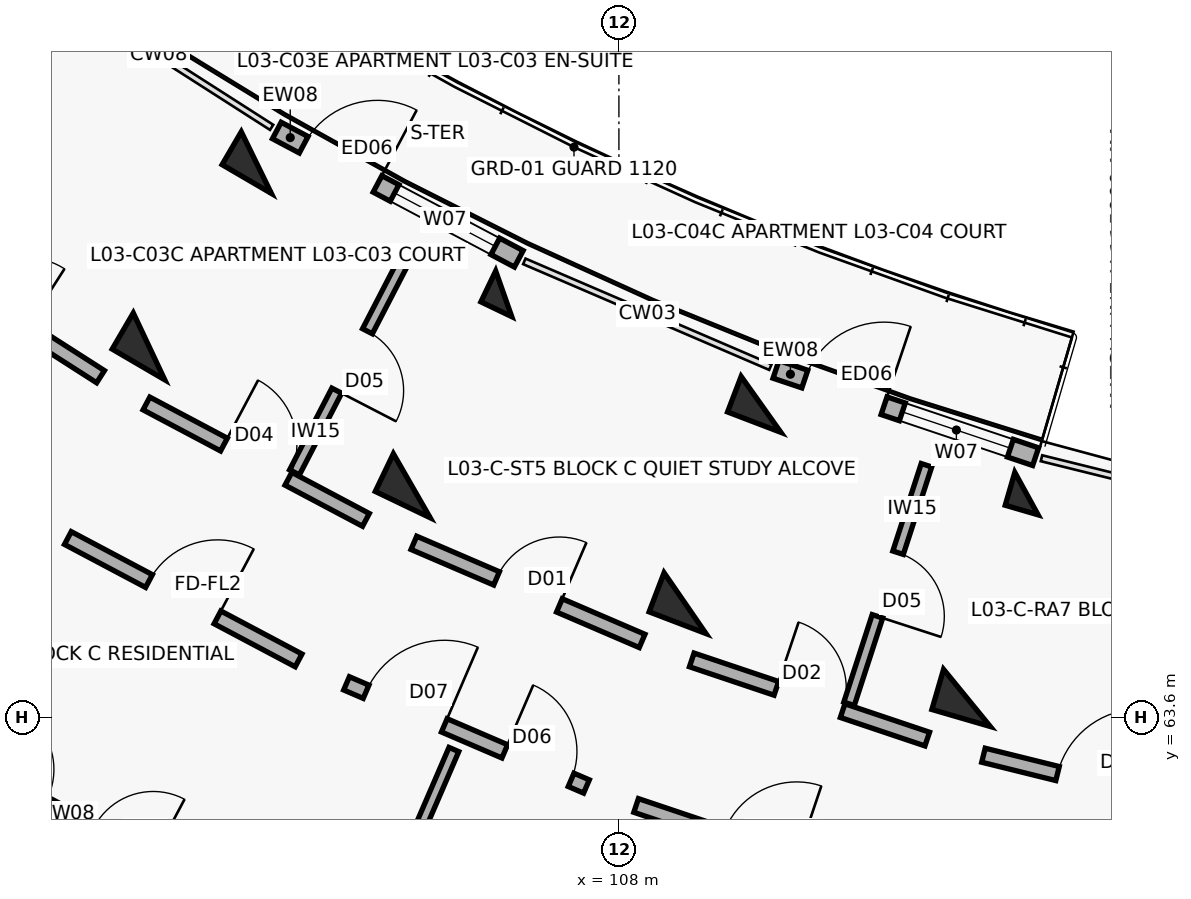
"""IFC4 building model, lengths in metres.
Left out: names, types, materials, properties, quantities, classifications, styles, units other than length and angle.
Written with IfcOpenShell. Run it as: python <this file> out.ifc"""

import sys

from ifc_helpers import new_model, si_unit, direction, frame, frame_2d, origin, origin_2d, place, context, subcontext, project, spatial, rectangle, extrude, element, fill, save


model = new_model("IFC4")
c1 = context("Model", 3, precision=1e-05, world=origin(), true_north=direction((0.0, 1.0)))
c2 = subcontext(c1, "Body", "Model", "MODEL_VIEW")
j1 = project(units=[si_unit("LENGTHUNIT", "METRE"), si_unit("PLANEANGLEUNIT", "RADIAN")], contexts=[c1])
p1 = place(None, origin())
s1 = spatial("IfcSite", under=j1, at=p1, CompositionType="ELEMENT")
p2 = place(p1, origin())
s2 = spatial("IfcBuilding", under=s1, at=p2, CompositionType="ELEMENT")
p3 = place(p2, frame((0.0, 0.0, 11.2)))
s3 = spatial("IfcBuildingStorey", under=s2, at=p3, CompositionType="ELEMENT", Elevation=11.2)
p4 = place(p3, frame((103.229, 70.896, 0.0), z_axis=(0.0, 0.0, 1.0), x_axis=(-0.504226211181, -0.863571611366, 0.0)))
e1 = element("IfcColumn", 1, at=p4, inside=s3, PredefinedType="COLUMN", context=c2, shape_type="SweptSolid", body=[
    extrude(rectangle(XDim=0.5, YDim=0.75, at=origin_2d()), origin(), (0.0, 0.0, 1.0), 3.1),
])
p5 = place(p3, frame((101.817, 68.478, 0.0), z_axis=(0.0, 0.0, 1.0), x_axis=(-0.504226211181, -0.863571611366, 0.0)))
e2 = element("IfcColumn", 2, at=p5, inside=s3, PredefinedType="COLUMN", context=c2, shape_type="SweptSolid", body=[
    extrude(rectangle(XDim=0.55, YDim=0.8, at=origin_2d()), origin(), (0.0, 0.0, 1.0), 3.1),
])
p6 = place(p3, frame((106.484, 69.169, 0.0), z_axis=(0.0, 0.0, 1.0), x_axis=(-0.432085748802, -0.901832526405, 0.0)))
e3 = element("IfcColumn", 3, at=p6, inside=s3, PredefinedType="COLUMN", context=c2, shape_type="SweptSolid", body=[
    extrude(rectangle(XDim=0.45, YDim=0.45, at=origin_2d()), origin(), (0.0, 0.0, 1.0), 3.1),
])
p7 = place(p3, frame((105.274, 66.644, 0.0), z_axis=(0.0, 0.0, 1.0), x_axis=(-0.432085748802, -0.901832526405, 0.0)))
e4 = element("IfcColumn", 4, at=p7, inside=s3, PredefinedType="COLUMN", context=c2, shape_type="SweptSolid", body=[
    extrude(rectangle(XDim=0.55, YDim=0.8, at=origin_2d()), origin(), (0.0, 0.0, 1.0), 3.1),
])
p8 = place(p3, frame((109.869, 67.714, 0.0), z_axis=(0.0, 0.0, 1.0), x_axis=(-0.357064076459, -0.934079892355, 0.0)))
e5 = element("IfcColumn", 5, at=p8, inside=s3, PredefinedType="COLUMN", context=c2, shape_type="SweptSolid", body=[
    extrude(rectangle(XDim=0.5, YDim=0.75, at=origin_2d()), origin(), (0.0, 0.0, 1.0), 3.1),
])
p9 = place(p3, frame((108.869, 65.099, 0.0), z_axis=(0.0, 0.0, 1.0), x_axis=(-0.357064076459, -0.934079892355, 0.0)))
e6 = element("IfcColumn", 6, at=p9, inside=s3, PredefinedType="COLUMN", context=c2, shape_type="SweptSolid", body=[
    extrude(rectangle(XDim=0.55, YDim=0.8, at=origin_2d()), origin(), (0.0, 0.0, 1.0), 3.1),
])
p10 = place(p3, frame((113.362, 66.54, 0.0), z_axis=(0.0, 0.0, 1.0), x_axis=(-0.27966144946, -0.96009867914, 0.0)))
e7 = element("IfcColumn", 7, at=p10, inside=s3, PredefinedType="COLUMN", context=c2, shape_type="SweptSolid", body=[
    extrude(rectangle(XDim=0.45, YDim=0.45, at=origin_2d()), origin(), (0.0, 0.0, 1.0), 3.1),
])
p11 = place(p3, frame((112.579, 63.852, 0.0), z_axis=(0.0, 0.0, 1.0), x_axis=(-0.27966144946, -0.96009867914, 0.0)))
e8 = element("IfcColumn", 8, at=p11, inside=s3, PredefinedType="COLUMN", context=c2, shape_type="SweptSolid", body=[
    extrude(rectangle(XDim=0.55, YDim=0.8, at=origin_2d()), origin(), (0.0, 0.0, 1.0), 3.1),
])
p12 = place(p3, frame((103.499, 71.318, 0.0), z_axis=(0.0, 0.0, 1.0), x_axis=(0.883438308286, -0.468547495407, 0.0)))
e9 = element("IfcWall", 9, at=p12, inside=s3, PredefinedType="SOLIDWALL", context=c2, shape_type="SweptSolid", body=[
    extrude(rectangle(XDim=3.604, YDim=0.245, at=frame_2d((1.802, 0.0))), origin(), (0.0, 0.0, 1.0), 2.25),
])
p13 = place(p12, frame((0.4, 0.0, 0.0)))
e10 = element("IfcOpeningElement", 10, at=p13, cuts=e9, PredefinedType="OPENING", context=c2, shape_type="SweptSolid", body=[
    extrude(rectangle(XDim=1.1, YDim=2.15, at=frame_2d((0.55, 1.075))), frame((0.0, 0.133, 0.0), z_axis=(0.0, -1.0, 0.0), x_axis=(1.0, 0.0, 0.0)), (0.0, 0.0, 1.0), 0.265),
])
p14 = place(p12, frame((1.754, 0.0, 0.35)))
e11 = element("IfcOpeningElement", 11, at=p14, cuts=e9, PredefinedType="OPENING", context=c2, shape_type="SweptSolid", body=[
    extrude(rectangle(XDim=1.5, YDim=1.65, at=frame_2d((0.75, 0.825))), frame((0.0, 0.133, 0.0), z_axis=(0.0, -1.0, 0.0), x_axis=(1.0, 0.0, 0.0)), (0.0, 0.0, 1.0), 0.265),
])
p15 = place(p3, frame((110.067, 68.175, 0.0), z_axis=(0.0, 0.0, 1.0), x_axis=(0.947887701822, -0.318604621332, 0.0)))
e12 = element("IfcWall", 12, at=p15, inside=s3, PredefinedType="SOLIDWALL", context=c2, shape_type="SweptSolid", body=[
    extrude(rectangle(XDim=3.604, YDim=0.245, at=frame_2d((1.802, 0.0))), origin(), (0.0, 0.0, 1.0), 2.25),
])
p16 = place(p15, frame((0.4, 0.0, 0.0)))
e13 = element("IfcOpeningElement", 13, at=p16, cuts=e12, PredefinedType="OPENING", context=c2, shape_type="SweptSolid", body=[
    extrude(rectangle(XDim=1.1, YDim=2.15, at=frame_2d((0.55, 1.075))), frame((0.0, 0.133, 0.0), z_axis=(0.0, -1.0, 0.0), x_axis=(1.0, 0.0, 0.0)), (0.0, 0.0, 1.0), 0.265),
])
p17 = place(p15, frame((1.754, 0.0, 0.35)))
e14 = element("IfcOpeningElement", 14, at=p17, cuts=e12, PredefinedType="OPENING", context=c2, shape_type="SweptSolid", body=[
    extrude(rectangle(XDim=1.5, YDim=1.65, at=frame_2d((0.75, 0.825))), frame((0.0, 0.133, 0.0), z_axis=(0.0, -1.0, 0.0), x_axis=(1.0, 0.0, 0.0)), (0.0, 0.0, 1.0), 0.265),
])
p18 = place(p3, frame((98.427, 69.841, 0.0), z_axis=(0.0, 0.0, 1.0), x_axis=(0.842280895761, -0.539038860043, 0.0)))
e15 = element("IfcWall", 15, at=p18, inside=s3, PredefinedType="SOLIDWALL", context=c2, shape_type="SweptSolid", body=[
    extrude(rectangle(XDim=3.269, YDim=0.19, at=frame_2d((1.634, 0.0))), origin(), (0.0, 0.0, 1.0), 2.08),
])
p19 = place(p18, frame((1.164, 0.0, 0.0)))
e16 = element("IfcOpeningElement", 16, at=p19, cuts=e15, PredefinedType="OPENING", context=c2, shape_type="SweptSolid", body=[
    extrude(rectangle(XDim=0.94, YDim=2.1, at=frame_2d((0.47, 1.05))), frame((0.0, 0.105, 0.0), z_axis=(0.0, -1.0, 0.0), x_axis=(1.0, 0.0, 0.0)), (0.0, 0.0, 1.0), 0.21),
])
p20 = place(p3, frame((100.75, 65.956, 0.0), z_axis=(0.0, 0.0, 1.0), x_axis=(0.883440266101, -0.468543803963, 0.0)))
e17 = element("IfcWall", 17, at=p20, inside=s3, PredefinedType="SOLIDWALL", context=c2, shape_type="SweptSolid", body=[
    extrude(rectangle(XDim=3.436, YDim=0.19, at=frame_2d((1.718, 0.0))), origin(), (0.0, 0.0, 1.0), 2.08),
])
p21 = place(p20, frame((1.208, 0.0, 0.0)))
e18 = element("IfcOpeningElement", 18, at=p21, cuts=e17, PredefinedType="OPENING", context=c2, shape_type="SweptSolid", body=[
    extrude(rectangle(XDim=1.02, YDim=2.15, at=frame_2d((0.51, 1.075))), frame((0.0, 0.105, 0.0), z_axis=(0.0, -1.0, 0.0), x_axis=(1.0, 0.0, 0.0)), (0.0, 0.0, 1.0), 0.21),
])
p22 = place(p3, frame((101.784, 67.726, 0.0), z_axis=(0.0, 0.0, 1.0), x_axis=(0.883444301944, -0.468536194293, 0.0)))
e19 = element("IfcWall", 19, at=p22, inside=s3, PredefinedType="SOLIDWALL", context=c2, shape_type="SweptSolid", body=[
    extrude(rectangle(XDim=3.269, YDim=0.19, at=frame_2d((1.634, 0.0))), origin(), (0.0, 0.0, 1.0), 2.08),
])
p23 = place(p22, frame((1.154, 0.0, 0.0)))
e20 = element("IfcOpeningElement", 20, at=p23, cuts=e19, PredefinedType="OPENING", context=c2, shape_type="SweptSolid", body=[
    extrude(rectangle(XDim=0.96, YDim=2.1, at=frame_2d((0.48, 1.05))), frame((0.0, 0.105, 0.0), z_axis=(0.0, -1.0, 0.0), x_axis=(1.0, 0.0, 0.0)), (0.0, 0.0, 1.0), 0.21),
])
p24 = place(p3, frame((105.247, 69.752, 0.0), z_axis=(0.0, 0.0, 1.0), x_axis=(-0.459187433099, -0.888339406581, 0.0)))
e21 = element("IfcWall", 21, at=p24, inside=s3, PredefinedType="PARTITIONING", context=c2, shape_type="SweptSolid", body=[
    extrude(rectangle(XDim=3.3, YDim=0.145, at=frame_2d((1.65, 0.0))), origin(), (0.0, 0.0, 1.0), 2.08),
])
p25 = place(p24, frame((1.21, 0.0, 0.0)))
e22 = element("IfcOpeningElement", 22, at=p25, cuts=e21, PredefinedType="OPENING", context=c2, shape_type="SweptSolid", body=[
    extrude(rectangle(XDim=0.88, YDim=2.1, at=frame_2d((0.44, 1.05))), frame((0.0, 0.083, 0.0), z_axis=(0.0, -1.0, 0.0), x_axis=(1.0, 0.0, 0.0)), (0.0, 0.0, 1.0), 0.165),
])
p26 = place(p3, frame((99.093, 63.216, 0.0), z_axis=(0.0, 0.0, 1.0), x_axis=(0.883432667361, -0.468558131121, 0.0)))
e23 = element("IfcWall", 23, at=p26, inside=s3, PredefinedType="PARTITIONING", context=c2, shape_type="SweptSolid", body=[
    extrude(rectangle(XDim=3.797, YDim=0.125, at=frame_2d((1.899, 0.0))), origin(), (0.0, 0.0, 1.0), 2.08),
])
p27 = place(p26, frame((0.65, 0.0, 0.0)))
e24 = element("IfcOpeningElement", 24, at=p27, cuts=e23, PredefinedType="OPENING", context=c2, shape_type="SweptSolid", body=[
    extrude(rectangle(XDim=0.9, YDim=2.1, at=frame_2d((0.45, 1.05))), frame((0.0, 0.073, 0.0), z_axis=(0.0, -1.0, 0.0), x_axis=(1.0, 0.0, 0.0)), (0.0, 0.0, 1.0), 0.145),
])
p28 = place(p26, frame((2.267, 0.0, 0.0)))
e25 = element("IfcOpeningElement", 25, at=p28, cuts=e23, PredefinedType="OPENING", context=c2, shape_type="SweptSolid", body=[
    extrude(rectangle(XDim=0.88, YDim=2.1, at=frame_2d((0.44, 1.05))), frame((0.0, 0.073, 0.0), z_axis=(0.0, -1.0, 0.0), x_axis=(1.0, 0.0, 0.0)), (0.0, 0.0, 1.0), 0.145),
])
p29 = place(p3, frame((104.417, 64.044, 0.0), z_axis=(0.0, 0.0, 1.0), x_axis=(0.918718172399, -0.394913813008, 0.0)))
e26 = element("IfcWall", 26, at=p29, inside=s3, PredefinedType="SOLIDWALL", context=c2, shape_type="SweptSolid", body=[
    extrude(rectangle(XDim=3.436, YDim=0.19, at=frame_2d((1.718, 0.0))), origin(), (0.0, 0.0, 1.0), 2.08),
])
p30 = place(p29, frame((0.28, 0.0, 0.0)))
e27 = element("IfcOpeningElement", 27, at=p30, cuts=e26, PredefinedType="OPENING", context=c2, shape_type="SweptSolid", body=[
    extrude(rectangle(XDim=1.12, YDim=2.15, at=frame_2d((0.56, 1.075))), frame((0.0, 0.105, 0.0), z_axis=(0.0, -1.0, 0.0), x_axis=(1.0, 0.0, 0.0)), (0.0, 0.0, 1.0), 0.21),
])
p31 = place(p29, frame((2.266, 0.0, 0.0)))
e28 = element("IfcOpeningElement", 28, at=p31, cuts=e26, PredefinedType="OPENING", context=c2, shape_type="SweptSolid", body=[
    extrude(rectangle(XDim=0.95, YDim=2.1, at=frame_2d((0.475, 1.05))), frame((0.0, 0.105, 0.0), z_axis=(0.0, -1.0, 0.0), x_axis=(1.0, 0.0, 0.0)), (0.0, 0.0, 1.0), 0.21),
])
p32 = place(p3, frame((105.302, 65.893, 0.0), z_axis=(0.0, 0.0, 1.0), x_axis=(0.918723391052, -0.394901672235, 0.0)))
e29 = element("IfcWall", 29, at=p32, inside=s3, PredefinedType="SOLIDWALL", context=c2, shape_type="SweptSolid", body=[
    extrude(rectangle(XDim=3.269, YDim=0.19, at=frame_2d((1.634, 0.0))), origin(), (0.0, 0.0, 1.0), 2.08),
])
p33 = place(p32, frame((1.184, 0.0, 0.0)))
e30 = element("IfcOpeningElement", 30, at=p33, cuts=e29, PredefinedType="OPENING", context=c2, shape_type="SweptSolid", body=[
    extrude(rectangle(XDim=0.9, YDim=2.1, at=frame_2d((0.45, 1.05))), frame((0.0, 0.105, 0.0), z_axis=(0.0, -1.0, 0.0), x_axis=(1.0, 0.0, 0.0)), (0.0, 0.0, 1.0), 0.21),
])
p34 = place(p3, frame((105.829, 63.173, 0.0), z_axis=(0.0, 0.0, 1.0), x_axis=(-0.396278945437, -0.91813016365, 0.0)))
e31 = element("IfcWall", 31, at=p34, inside=s3, PredefinedType="PARTITIONING", context=c2, shape_type="SweptSolid", body=[
    extrude(rectangle(XDim=7.95, YDim=0.14, at=frame_2d((3.975, 0.0))), origin(), (0.0, 0.0, 1.0), 2.08),
])
p35 = place(p34, frame((6.05, 0.0, 0.0)))
e32 = element("IfcOpeningElement", 32, at=p35, cuts=e31, PredefinedType="OPENING", context=c2, shape_type="SweptSolid", body=[
    extrude(rectangle(XDim=0.92, YDim=2.1, at=frame_2d((0.46, 1.05))), frame((0.0, 0.08, 0.0), z_axis=(0.0, -1.0, 0.0), x_axis=(1.0, 0.0, 0.0)), (0.0, 0.0, 1.0), 0.16),
])
p36 = place(p3, frame((108.227, 62.437, 0.0), z_axis=(0.0, 0.0, 1.0), x_axis=(0.947884468821, -0.318614239745, 0.0)))
e33 = element("IfcWall", 33, at=p36, inside=s3, PredefinedType="SOLIDWALL", context=c2, shape_type="SweptSolid", body=[
    extrude(rectangle(XDim=3.436, YDim=0.19, at=frame_2d((1.718, 0.0))), origin(), (0.0, 0.0, 1.0), 2.08),
])
p37 = place(p36, frame((1.208, 0.0, 0.0)))
e34 = element("IfcOpeningElement", 34, at=p37, cuts=e33, PredefinedType="OPENING", context=c2, shape_type="SweptSolid", body=[
    extrude(rectangle(XDim=1.02, YDim=2.15, at=frame_2d((0.51, 1.075))), frame((0.0, 0.105, 0.0), z_axis=(0.0, -1.0, 0.0), x_axis=(1.0, 0.0, 0.0)), (0.0, 0.0, 1.0), 0.21),
])
p38 = place(p3, frame((108.958, 64.352, 0.0), z_axis=(0.0, 0.0, 1.0), x_axis=(0.94787351033, -0.318646839643, 0.0)))
e35 = element("IfcWall", 35, at=p38, inside=s3, PredefinedType="SOLIDWALL", context=c2, shape_type="SweptSolid", body=[
    extrude(rectangle(XDim=3.269, YDim=0.19, at=frame_2d((1.634, 0.0))), origin(), (0.0, 0.0, 1.0), 2.08),
])
p39 = place(p38, frame((1.174, 0.0, 0.0)))
e36 = element("IfcOpeningElement", 36, at=p39, cuts=e35, PredefinedType="OPENING", context=c2, shape_type="SweptSolid", body=[
    extrude(rectangle(XDim=0.92, YDim=2.1, at=frame_2d((0.46, 1.05))), frame((0.0, 0.105, 0.0), z_axis=(0.0, -1.0, 0.0), x_axis=(1.0, 0.0, 0.0)), (0.0, 0.0, 1.0), 0.21),
])
p40 = place(p3, frame((112.046, 66.914, 0.0), z_axis=(0.0, 0.0, 1.0), x_axis=(-0.308582493915, -0.951197584337, 0.0)))
e37 = element("IfcWall", 37, at=p40, inside=s3, PredefinedType="PARTITIONING", context=c2, shape_type="SweptSolid", body=[
    extrude(rectangle(XDim=3.3, YDim=0.145, at=frame_2d((1.65, 0.0))), origin(), (0.0, 0.0, 1.0), 2.08),
])
p41 = place(p40, frame((1.21, 0.0, 0.0)))
e38 = element("IfcOpeningElement", 38, at=p41, cuts=e37, PredefinedType="OPENING", context=c2, shape_type="SweptSolid", body=[
    extrude(rectangle(XDim=0.88, YDim=2.1, at=frame_2d((0.44, 1.05))), frame((0.0, 0.083, 0.0), z_axis=(0.0, -1.0, 0.0), x_axis=(1.0, 0.0, 0.0)), (0.0, 0.0, 1.0), 0.165),
])
p42 = place(p3, frame((112.796, 63.098, 0.0), z_axis=(0.0, 0.0, 1.0), x_axis=(0.970708998014, -0.240258280136, 0.0)))
e39 = element("IfcWall", 39, at=p42, inside=s3, PredefinedType="SOLIDWALL", context=c2, shape_type="SweptSolid", body=[
    extrude(rectangle(XDim=3.129, YDim=0.19, at=frame_2d((1.564, 0.0))), origin(), (0.0, 0.0, 1.0), 2.08),
])
p43 = place(p42, frame((1.004, 0.0, 0.0)))
e40 = element("IfcOpeningElement", 40, at=p43, cuts=e39, PredefinedType="OPENING", context=c2, shape_type="SweptSolid", body=[
    extrude(rectangle(XDim=1.12, YDim=2.15, at=frame_2d((0.56, 1.075))), frame((0.0, 0.105, 0.0), z_axis=(0.0, -1.0, 0.0), x_axis=(1.0, 0.0, 0.0)), (0.0, 0.0, 1.0), 0.21),
])
p44 = place(p13, origin())
e41 = element("IfcDoor", 41, at=p44, inside=s3, OperationType="SINGLE_SWING_RIGHT", PredefinedType="DOOR", context=c2, shape_type="SweptSolid", body=[
    extrude(rectangle(XDim=1.1, YDim=2.15, at=frame_2d((0.55, 1.075))), frame((0.0, 0.025, 0.0), z_axis=(0.0, -1.0, 0.0), x_axis=(1.0, 0.0, 0.0)), (0.0, 0.0, 1.0), 0.05),
])
fill(e10, e41)
p45 = place(p14, origin())
e42 = element("IfcWindow", 42, at=p45, inside=s3, PartitioningType="DOUBLE_PANEL_VERTICAL", PredefinedType="WINDOW", context=c2, shape_type="SweptSolid", body=[
    extrude(rectangle(XDim=1.5, YDim=1.65, at=frame_2d((0.75, 0.825))), frame((0.0, 0.03, 0.0), z_axis=(0.0, -1.0, 0.0), x_axis=(1.0, 0.0, 0.0)), (0.0, 0.0, 1.0), 0.06),
])
fill(e11, e42)
p46 = place(p16, origin())
e43 = element("IfcDoor", 43, at=p46, inside=s3, OperationType="SINGLE_SWING_RIGHT", PredefinedType="DOOR", context=c2, shape_type="SweptSolid", body=[
    extrude(rectangle(XDim=1.1, YDim=2.15, at=frame_2d((0.55, 1.075))), frame((0.0, 0.025, 0.0), z_axis=(0.0, -1.0, 0.0), x_axis=(1.0, 0.0, 0.0)), (0.0, 0.0, 1.0), 0.05),
])
fill(e13, e43)
p47 = place(p17, origin())
e44 = element("IfcWindow", 44, at=p47, inside=s3, PartitioningType="DOUBLE_PANEL_VERTICAL", PredefinedType="WINDOW", context=c2, shape_type="SweptSolid", body=[
    extrude(rectangle(XDim=1.5, YDim=1.65, at=frame_2d((0.75, 0.825))), frame((0.0, 0.03, 0.0), z_axis=(0.0, -1.0, 0.0), x_axis=(1.0, 0.0, 0.0)), (0.0, 0.0, 1.0), 0.06),
])
fill(e14, e44)
p48 = place(p21, origin())
e45 = element("IfcDoor", 45, at=p48, inside=s3, OperationType="SINGLE_SWING_RIGHT", PredefinedType="DOOR", context=c2, shape_type="SweptSolid", body=[
    extrude(rectangle(XDim=1.02, YDim=2.15, at=frame_2d((0.51, 1.075))), frame((0.0, 0.025, 0.0), z_axis=(0.0, -1.0, 0.0), x_axis=(1.0, 0.0, 0.0)), (0.0, 0.0, 1.0), 0.05),
])
fill(e18, e45)
p49 = place(p23, origin())
e46 = element("IfcDoor", 46, at=p49, inside=s3, OperationType="SINGLE_SWING_LEFT", PredefinedType="DOOR", context=c2, shape_type="SweptSolid", body=[
    extrude(rectangle(XDim=0.96, YDim=2.1, at=frame_2d((0.48, 1.05))), frame((0.0, 0.025, 0.0), z_axis=(0.0, -1.0, 0.0), x_axis=(1.0, 0.0, 0.0)), (0.0, 0.0, 1.0), 0.05),
])
fill(e20, e46)
p50 = place(p25, origin())
e47 = element("IfcDoor", 47, at=p50, inside=s3, OperationType="SINGLE_SWING_RIGHT", PredefinedType="DOOR", context=c2, shape_type="SweptSolid", body=[
    extrude(rectangle(XDim=0.88, YDim=2.1, at=frame_2d((0.44, 1.05))), frame((0.0, 0.025, 0.0), z_axis=(0.0, -1.0, 0.0), x_axis=(1.0, 0.0, 0.0)), (0.0, 0.0, 1.0), 0.05),
])
fill(e22, e47)
p51 = place(p30, origin())
e48 = element("IfcDoor", 48, at=p51, inside=s3, OperationType="SINGLE_SWING_RIGHT", PredefinedType="DOOR", context=c2, shape_type="SweptSolid", body=[
    extrude(rectangle(XDim=1.12, YDim=2.15, at=frame_2d((0.56, 1.075))), frame((0.0, 0.025, 0.0), z_axis=(0.0, -1.0, 0.0), x_axis=(1.0, 0.0, 0.0)), (0.0, 0.0, 1.0), 0.05),
])
fill(e27, e48)
p52 = place(p31, origin())
e49 = element("IfcDoor", 49, at=p52, inside=s3, OperationType="SINGLE_SWING_LEFT", PredefinedType="DOOR", context=c2, shape_type="SweptSolid", body=[
    extrude(rectangle(XDim=0.95, YDim=2.1, at=frame_2d((0.475, 1.05))), frame((0.0, 0.025, 0.0), z_axis=(0.0, -1.0, 0.0), x_axis=(1.0, 0.0, 0.0)), (0.0, 0.0, 1.0), 0.05),
])
fill(e28, e49)
p53 = place(p33, origin())
e50 = element("IfcDoor", 50, at=p53, inside=s3, OperationType="SINGLE_SWING_RIGHT", PredefinedType="DOOR", context=c2, shape_type="SweptSolid", body=[
    extrude(rectangle(XDim=0.9, YDim=2.1, at=frame_2d((0.45, 1.05))), frame((0.0, 0.025, 0.0), z_axis=(0.0, -1.0, 0.0), x_axis=(1.0, 0.0, 0.0)), (0.0, 0.0, 1.0), 0.05),
])
fill(e30, e50)
p54 = place(p39, origin())
e51 = element("IfcDoor", 51, at=p54, inside=s3, OperationType="SINGLE_SWING_LEFT", PredefinedType="DOOR", context=c2, shape_type="SweptSolid", body=[
    extrude(rectangle(XDim=0.92, YDim=2.1, at=frame_2d((0.46, 1.05))), frame((0.0, 0.025, 0.0), z_axis=(0.0, -1.0, 0.0), x_axis=(1.0, 0.0, 0.0)), (0.0, 0.0, 1.0), 0.05),
])
fill(e36, e51)
p55 = place(p41, origin())
e52 = element("IfcDoor", 52, at=p55, inside=s3, OperationType="SINGLE_SWING_RIGHT", PredefinedType="DOOR", context=c2, shape_type="SweptSolid", body=[
    extrude(rectangle(XDim=0.88, YDim=2.1, at=frame_2d((0.44, 1.05))), frame((0.0, 0.025, 0.0), z_axis=(0.0, -1.0, 0.0), x_axis=(1.0, 0.0, 0.0)), (0.0, 0.0, 1.0), 0.05),
])
fill(e38, e52)
p56 = place(p43, origin())
e53 = element("IfcDoor", 53, at=p56, inside=s3, OperationType="SINGLE_SWING_RIGHT", PredefinedType="DOOR", context=c2, shape_type="SweptSolid", body=[
    extrude(rectangle(XDim=1.12, YDim=2.15, at=frame_2d((0.56, 1.075))), frame((0.0, 0.025, 0.0), z_axis=(0.0, -1.0, 0.0), x_axis=(1.0, 0.0, 0.0)), (0.0, 0.0, 1.0), 0.05),
])
fill(e40, e53)
save(model, sys.argv[1])
